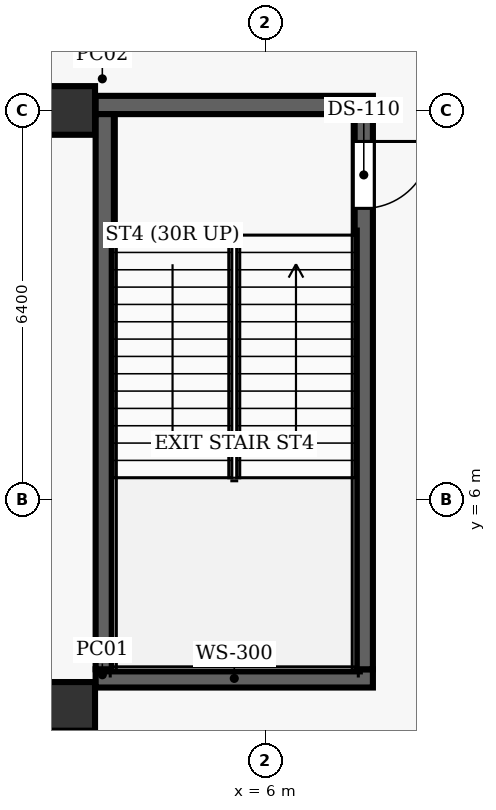
"""IFC4 building model, lengths in metres.
Left out: names, types, materials, properties, quantities, classifications, styles, units other than length and angle.
Written with IfcOpenShell. Run it as: python <this file> out.ifc"""

import sys

from ifc_helpers import new_model, si_unit, direction, frame, frame_2d, origin, origin_2d, place, context, subcontext, project, spatial, rectangle, extrude, element, fill, save


model = new_model("IFC4")
c1 = context("Model", 3, precision=1e-05, world=origin(), true_north=direction((0.0, 1.0)))
c2 = subcontext(c1, "Body", "Model", "MODEL_VIEW")
j1 = project(units=[si_unit("LENGTHUNIT", "METRE"), si_unit("PLANEANGLEUNIT", "RADIAN")], contexts=[c1])
p1 = place(None, origin())
s1 = spatial("IfcSite", under=j1, at=p1, CompositionType="ELEMENT")
p2 = place(p1, origin())
s2 = spatial("IfcBuilding", under=s1, at=p2, CompositionType="ELEMENT")
p3 = place(p2, frame((0.0, 0.0, 18.6)))
s3 = spatial("IfcBuildingStorey", under=s2, at=p3, CompositionType="ELEMENT", Elevation=18.6)
for number, where, z_axis, x_axis in (
    (1, (2.8, 2.6, 0.0), (0.0, 0.0, 1.0), (1.0, 0.0, 0.0)),
    (2, (2.8, 12.4, 0.0), (0.0, 0.0, 1.0), (1.0, 0.0, 0.0)),
):
    element("IfcColumn", number, at=place(p3, frame(where, z_axis=z_axis, x_axis=x_axis)), inside=s3, PredefinedType="COLUMN", context=c2, shape_type="SweptSolid", body=[
        extrude(rectangle(XDim=0.8, YDim=0.8, at=origin_2d()), origin(), (0.0, 0.0, 1.0), 5.4),
    ])
for number, where, z_axis, x_axis in (
    (3, (3.21, 3.06, 0.0), (0.0, 0.0, 1.0), (1.0, 0.0, 0.0)),
    (4, (3.21, 12.49, 0.0), (0.0, 0.0, 1.0), (1.0, 0.0, 0.0)),
):
    element("IfcWall", number, at=place(p3, frame(where, z_axis=z_axis, x_axis=x_axis)), inside=s3, PredefinedType="SHEAR", context=c2, shape_type="SweptSolid", body=[
        extrude(rectangle(XDim=4.56, YDim=0.3, at=frame_2d((2.28, 0.0))), origin(), (0.0, 0.0, 1.0), 5.4),
    ])
p4 = place(p3, frame((3.36, 3.21, 0.0), z_axis=(0.0, 0.0, 1.0), x_axis=(0.0, 1.0, 0.0)))
e5 = element("IfcWall", 5, at=p4, inside=s3, PredefinedType="SHEAR", context=c2, shape_type="SweptSolid", body=[
    extrude(rectangle(XDim=9.13, YDim=0.3, at=frame_2d((4.565, 0.0))), origin(), (0.0, 0.0, 1.0), 5.4),
])
p5 = place(p3, frame((7.62, 12.34, 0.0), z_axis=(0.0, 0.0, 1.0), x_axis=(0.0, -1.0, 0.0)))
e6 = element("IfcWall", 6, at=p5, inside=s3, PredefinedType="SHEAR", context=c2, shape_type="SweptSolid", body=[
    extrude(rectangle(XDim=9.13, YDim=0.3, at=frame_2d((4.565, 0.0))), origin(), (0.0, 0.0, 1.0), 5.4),
])
p6 = place(p5, frame((0.45, 0.0, 0.0)))
e7 = element("IfcOpeningElement", 7, at=p6, cuts=e6, PredefinedType="OPENING", context=c2, shape_type="SweptSolid", body=[
    extrude(rectangle(XDim=1.1, YDim=2.15, at=frame_2d((0.55, 1.075))), frame((0.0, 0.16, 0.0), z_axis=(0.0, -1.0, 0.0), x_axis=(1.0, 0.0, 0.0)), (0.0, 0.0, 1.0), 0.32),
])
p7 = place(p6, origin())
e8 = element("IfcDoor", 8, at=p7, inside=s3, OperationType="SINGLE_SWING_LEFT", PredefinedType="DOOR", context=c2, shape_type="SweptSolid", body=[
    extrude(rectangle(XDim=1.1, YDim=2.15, at=frame_2d((0.55, 1.075))), frame((0.0, 0.025, 0.0), z_axis=(0.0, -1.0, 0.0), x_axis=(1.0, 0.0, 0.0)), (0.0, 0.0, 1.0), 0.05),
])
fill(e7, e8)
save(model, sys.argv[1])
